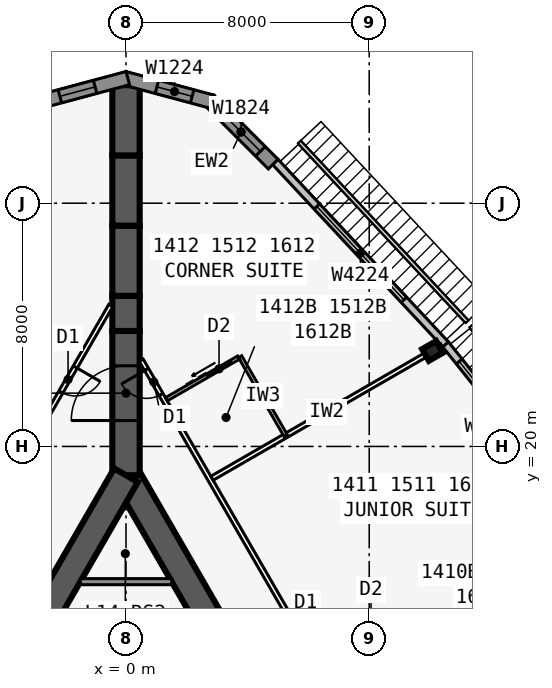
"""IFC4 building model, lengths in metres.
Left out: names, types, materials, properties, quantities, classifications, styles, units other than length and angle.
Written with IfcOpenShell. Run it as: python <this file> out.ifc"""

import sys

from ifc_helpers import new_model, si_unit, direction, frame, frame_2d, origin, origin_2d, place, context, subcontext, project, spatial, polyline, rectangle, i_section, outline, extrude, element, fill, save


model = new_model("IFC4")
c1 = context("Model", 3, precision=1e-05, world=origin(), true_north=direction((0.0, 1.0)))
c2 = subcontext(c1, "Body", "Model", "MODEL_VIEW")
j1 = project(units=[si_unit("LENGTHUNIT", "METRE"), si_unit("PLANEANGLEUNIT", "RADIAN")], contexts=[c1])
p1 = place(None, origin())
s1 = spatial("IfcSite", under=j1, at=p1, CompositionType="ELEMENT")
p2 = place(p1, origin())
s2 = spatial("IfcBuilding", under=s1, at=p2, CompositionType="ELEMENT")
p3 = place(p2, frame((0.0, 0.0, 59.1)))
s3 = spatial("IfcBuildingStorey", under=s2, at=p3, CompositionType="ELEMENT", Elevation=59.1)
p4 = place(p3, frame((16.5, -9.526, 0.0), z_axis=(0.0, 0.0, 1.0), x_axis=(-0.499999749417, 0.866025548458, 0.0)))
e1 = element("IfcWall", 1, at=p4, inside=s3, PredefinedType="SHEAR", context=c2, shape_type="SweptSolid", body=[
    extrude(rectangle(XDim=33.0, YDim=0.9, at=frame_2d((16.5, 0.0))), origin(), (0.0, 0.0, 1.0), 3.4),
])
p5 = place(p4, frame((14.15, 0.0, 0.0)))
e2 = element("IfcOpeningElement", 2, at=p5, cuts=e1, PredefinedType="OPENING", context=c2, shape_type="SweptSolid", body=[
    extrude(rectangle(XDim=1.8, YDim=2.13, at=frame_2d((0.9, 1.065))), frame((0.0, 0.46, 0.0), z_axis=(0.0, -1.0, 0.0), x_axis=(1.0, 0.0, 0.0)), (0.0, 0.0, 1.0), 0.92),
])
p6 = place(p4, frame((12.6, 0.0, 0.0)))
e3 = element("IfcOpeningElement", 3, at=p6, cuts=e1, PredefinedType="OPENING", context=c2, shape_type="SweptSolid", body=[
    extrude(rectangle(XDim=1.0, YDim=2.13, at=frame_2d((0.5, 1.065))), frame((0.0, 0.46, 0.0), z_axis=(0.0, -1.0, 0.0), x_axis=(1.0, 0.0, 0.0)), (0.0, 0.0, 1.0), 0.92),
])
p7 = place(p3, frame((0.0, 19.052, 0.0), z_axis=(0.0, 0.0, 1.0), x_axis=(-0.499999749417, -0.866025548458, 0.0)))
e4 = element("IfcWall", 4, at=p7, inside=s3, PredefinedType="SHEAR", context=c2, shape_type="SweptSolid", body=[
    extrude(rectangle(XDim=33.0, YDim=0.9, at=frame_2d((16.5, 0.0))), origin(), (0.0, 0.0, 1.0), 3.4),
])
p8 = place(p7, frame((14.15, 0.0, 0.0)))
e5 = element("IfcOpeningElement", 5, at=p8, cuts=e4, PredefinedType="OPENING", context=c2, shape_type="SweptSolid", body=[
    extrude(rectangle(XDim=1.8, YDim=2.13, at=frame_2d((0.9, 1.065))), frame((0.0, 0.46, 0.0), z_axis=(0.0, -1.0, 0.0), x_axis=(1.0, 0.0, 0.0)), (0.0, 0.0, 1.0), 0.92),
])
p9 = place(p7, frame((12.6, 0.0, 0.0)))
e6 = element("IfcOpeningElement", 6, at=p9, cuts=e4, PredefinedType="OPENING", context=c2, shape_type="SweptSolid", body=[
    extrude(rectangle(XDim=1.0, YDim=2.13, at=frame_2d((0.5, 1.065))), frame((0.0, 0.46, 0.0), z_axis=(0.0, -1.0, 0.0), x_axis=(1.0, 0.0, 0.0)), (0.0, 0.0, 1.0), 0.92),
])
p10 = place(p3, frame((0.0, 19.052, 0.0), z_axis=(0.0, 0.0, 1.0), x_axis=(0.0, 1.0, 0.0)))
e7 = element("IfcWall", 7, at=p10, inside=s3, PredefinedType="SHEAR", context=c2, shape_type="SweptSolid", body=[
    extrude(rectangle(XDim=4.746, YDim=0.9, at=frame_2d((2.373, 0.0))), origin(), (0.0, 0.0, 1.0), 3.4),
])
p11 = place(p10, frame((1.8, 0.0, 0.0)))
e8 = element("IfcOpeningElement", 8, at=p11, cuts=e7, PredefinedType="OPENING", context=c2, shape_type="SweptSolid", body=[
    extrude(rectangle(XDim=1.8, YDim=2.13, at=frame_2d((0.9, 1.065))), frame((0.0, 0.46, 0.0), z_axis=(0.0, -1.0, 0.0), x_axis=(1.0, 0.0, 0.0)), (0.0, 0.0, 1.0), 0.92),
])
p12 = place(p3, frame((0.0, 23.799, 0.0), z_axis=(0.0, 0.0, 1.0), x_axis=(0.0, 1.0, 0.0)))
e9 = element("IfcWall", 9, at=p12, inside=s3, PredefinedType="SHEAR", context=c2, shape_type="SweptSolid", body=[
    extrude(rectangle(XDim=1.155, YDim=0.9, at=frame_2d((0.577, 0.0))), origin(), (0.0, 0.0, 1.0), 3.4),
])
p13 = place(p3, frame((0.0, 24.953, 0.0), z_axis=(0.0, 0.0, 1.0), x_axis=(0.0, 1.0, 0.0)))
e10 = element("IfcWall", 10, at=p13, inside=s3, PredefinedType="SHEAR", context=c2, shape_type="SweptSolid", body=[
    extrude(rectangle(XDim=2.309, YDim=0.9, at=frame_2d((1.155, 0.0))), origin(), (0.0, 0.0, 1.0), 3.4),
])
p14 = place(p3, frame((0.0, 27.263, 0.0), z_axis=(0.0, 0.0, 1.0), x_axis=(0.0, 1.0, 0.0)))
e11 = element("IfcWall", 11, at=p14, inside=s3, PredefinedType="SHEAR", context=c2, shape_type="SweptSolid", body=[
    extrude(rectangle(XDim=2.31, YDim=0.9, at=frame_2d((1.155, 0.0))), origin(), (0.0, 0.0, 1.0), 3.4),
])
p15 = place(p3, frame((0.0, 29.572, 0.0), z_axis=(0.0, 0.0, 1.0), x_axis=(0.0, 1.0, 0.0)))
e12 = element("IfcWall", 12, at=p15, inside=s3, PredefinedType="SHEAR", context=c2, shape_type="SweptSolid", body=[
    extrude(rectangle(XDim=2.309, YDim=0.9, at=frame_2d((1.155, 0.0))), origin(), (0.0, 0.0, 1.0), 3.4),
])
p16 = place(p3, frame((10.083, 23.142, 0.0), z_axis=(0.0, 0.0, 1.0), x_axis=(-0.5, 0.866025403784, 0.0)))
e13 = element("IfcColumn", 13, at=p16, inside=s3, PredefinedType="COLUMN", context=c2, shape_type="SweptSolid", body=[
    extrude(i_section(OverallWidth=0.442, OverallDepth=0.531, WebThickness=0.066, FlangeThickness=0.106, at=origin_2d()), origin(), (0.0, 0.0, 1.0), 3.4),
])
p17 = place(p3, frame((13.664, 19.414, 0.0), z_axis=(0.0, 0.0, 1.0), x_axis=(-0.624594965756, 0.780948864364, 0.0)))
e14 = element("IfcWall", 14, at=p17, inside=s3, PredefinedType="STANDARD", context=c2, shape_type="SweptSolid", body=[
    extrude(rectangle(XDim=5.058, YDim=0.25, at=frame_2d((2.529, 0.0))), origin(), (0.0, 0.0, 1.0), 3.235),
])
p18 = place(p17, frame((0.729, 0.0, 0.45)))
e15 = element("IfcOpeningElement", 15, at=p18, cuts=e14, PredefinedType="OPENING", context=c2, shape_type="SweptSolid", body=[
    extrude(rectangle(XDim=3.6, YDim=2.4, at=frame_2d((1.8, 1.2))), frame((0.0, 0.135, 0.0), z_axis=(0.0, -1.0, 0.0), x_axis=(1.0, 0.0, 0.0)), (0.0, 0.0, 1.0), 0.27),
])
p19 = place(p3, frame((10.511, 23.357, 0.0), z_axis=(0.0, 0.0, 1.0), x_axis=(-0.682289646561, 0.731081964075, 0.0)))
e16 = element("IfcWall", 16, at=p19, inside=s3, PredefinedType="STANDARD", context=c2, shape_type="SweptSolid", body=[
    extrude(rectangle(XDim=8.211, YDim=0.25, at=frame_2d((4.105, 0.0))), origin(), (0.0, 0.0, 1.0), 3.235),
])
p20 = place(p19, frame((2.006, 0.0, 0.45)))
e17 = element("IfcOpeningElement", 17, at=p20, cuts=e16, PredefinedType="OPENING", context=c2, shape_type="SweptSolid", body=[
    extrude(rectangle(XDim=4.2, YDim=2.4, at=frame_2d((2.1, 1.2))), frame((0.0, 0.135, 0.0), z_axis=(0.0, -1.0, 0.0), x_axis=(1.0, 0.0, 0.0)), (0.0, 0.0, 1.0), 0.27),
])
p21 = place(p3, frame((4.841, 29.286, 0.0), z_axis=(0.0, 0.0, 1.0), x_axis=(-0.707106781187, 0.707106781187, 0.0)))
e18 = element("IfcWall", 18, at=p21, inside=s3, PredefinedType="SOLIDWALL", context=c2, shape_type="SweptSolid", body=[
    extrude(rectangle(XDim=2.988, YDim=0.45, at=frame_2d((1.494, 0.0))), origin(), (0.0, 0.0, 1.0), 3.235),
])
p22 = place(p21, frame((0.594, 0.0, 0.45)))
e19 = element("IfcOpeningElement", 19, at=p22, cuts=e18, PredefinedType="OPENING", context=c2, shape_type="SweptSolid", body=[
    extrude(rectangle(XDim=1.8, YDim=2.4, at=frame_2d((0.9, 1.2))), frame((0.0, 0.235, 0.0), z_axis=(0.0, -1.0, 0.0), x_axis=(1.0, 0.0, 0.0)), (0.0, 0.0, 1.0), 0.47),
])
p23 = place(p3, frame((2.829, 31.341, 0.0), z_axis=(0.0, 0.0, 1.0), x_axis=(-0.965930548995, 0.258801419081, 0.0)))
e20 = element("IfcWall", 20, at=p23, inside=s3, PredefinedType="SOLIDWALL", context=c2, shape_type="SweptSolid", body=[
    extrude(outline(polyline([(2.989, 0.225), (2.929, 0.225), (2.438, 0.093), (2.402, 0.225), (0.0, 0.225), (0.0, -0.225), (2.989, -0.225), (2.989, 0.225)])), origin(), (0.0, 0.0, 1.0), 3.235),
])
p24 = place(p23, frame((0.676, 0.0, 0.45)))
e21 = element("IfcOpeningElement", 21, at=p24, cuts=e20, PredefinedType="OPENING", context=c2, shape_type="SweptSolid", body=[
    extrude(rectangle(XDim=1.2, YDim=2.4, at=frame_2d((0.6, 1.2))), frame((0.0, 0.235, 0.0), z_axis=(0.0, -1.0, 0.0), x_axis=(1.0, 0.0, 0.0)), (0.0, 0.0, 1.0), 0.47),
])
p25 = place(p3, frame((0.058, 32.114, 0.0), z_axis=(0.0, 0.0, 1.0), x_axis=(-0.965930548995, -0.258801419081, 0.0)))
e22 = element("IfcWall", 22, at=p25, inside=s3, PredefinedType="SOLIDWALL", context=c2, shape_type="SweptSolid", body=[
    extrude(outline(polyline([(2.989, 0.225), (0.586, 0.225), (0.551, 0.093), (0.059, 0.225), (0.0, 0.225), (0.0, -0.225), (2.989, -0.225), (2.989, 0.225)])), origin(), (0.0, 0.0, 1.0), 3.235),
])
p26 = place(p25, frame((1.113, 0.0, 0.45)))
e23 = element("IfcOpeningElement", 23, at=p26, cuts=e22, PredefinedType="OPENING", context=c2, shape_type="SweptSolid", body=[
    extrude(rectangle(XDim=1.2, YDim=2.4, at=frame_2d((0.6, 1.2))), frame((0.0, 0.235, 0.0), z_axis=(0.0, -1.0, 0.0), x_axis=(1.0, 0.0, 0.0)), (0.0, 0.0, 1.0), 0.47),
])
p27 = place(p3, frame((20.027, -10.985, 0.0), z_axis=(0.0, 0.0, 1.0), x_axis=(-0.500001677587, 0.866024435227, 0.0)))
e24 = element("IfcWall", 24, at=p27, inside=s3, PredefinedType="PARTITIONING", context=c2, shape_type="SweptSolid", body=[
    extrude(rectangle(XDim=39.054, YDim=0.15, at=frame_2d((19.527, 0.0))), origin(), (0.0, 0.0, 1.0), 3.235),
])
p28 = place(p27, frame((0.352, 0.0, 0.0)))
e25 = element("IfcOpeningElement", 25, at=p28, cuts=e24, PredefinedType="OPENING", context=c2, shape_type="SweptSolid", body=[
    extrude(rectangle(XDim=0.95, YDim=2.13, at=frame_2d((0.475, 1.065))), frame((0.0, 0.085, 0.0), z_axis=(0.0, -1.0, 0.0), x_axis=(1.0, 0.0, 0.0)), (0.0, 0.0, 1.0), 0.17),
])
p29 = place(p27, frame((10.352, 0.0, 0.0)))
e26 = element("IfcOpeningElement", 26, at=p29, cuts=e24, PredefinedType="OPENING", context=c2, shape_type="SweptSolid", body=[
    extrude(rectangle(XDim=0.95, YDim=2.13, at=frame_2d((0.475, 1.065))), frame((0.0, 0.085, 0.0), z_axis=(0.0, -1.0, 0.0), x_axis=(1.0, 0.0, 0.0)), (0.0, 0.0, 1.0), 0.17),
])
p30 = place(p27, frame((17.152, 0.0, 0.0)))
e27 = element("IfcOpeningElement", 27, at=p30, cuts=e24, PredefinedType="OPENING", context=c2, shape_type="SweptSolid", body=[
    extrude(rectangle(XDim=0.95, YDim=2.13, at=frame_2d((0.475, 1.065))), frame((0.0, 0.085, 0.0), z_axis=(0.0, -1.0, 0.0), x_axis=(1.0, 0.0, 0.0)), (0.0, 0.0, 1.0), 0.17),
])
p31 = place(p27, frame((20.952, 0.0, 0.0)))
e28 = element("IfcOpeningElement", 28, at=p31, cuts=e24, PredefinedType="OPENING", context=c2, shape_type="SweptSolid", body=[
    extrude(rectangle(XDim=0.95, YDim=2.13, at=frame_2d((0.475, 1.065))), frame((0.0, 0.085, 0.0), z_axis=(0.0, -1.0, 0.0), x_axis=(1.0, 0.0, 0.0)), (0.0, 0.0, 1.0), 0.17),
])
p32 = place(p27, frame((27.752, 0.0, 0.0)))
e29 = element("IfcOpeningElement", 29, at=p32, cuts=e24, PredefinedType="OPENING", context=c2, shape_type="SweptSolid", body=[
    extrude(rectangle(XDim=0.95, YDim=2.13, at=frame_2d((0.475, 1.065))), frame((0.0, 0.085, 0.0), z_axis=(0.0, -1.0, 0.0), x_axis=(1.0, 0.0, 0.0)), (0.0, 0.0, 1.0), 0.17),
])
p33 = place(p27, frame((37.752, 0.0, 0.0)))
e30 = element("IfcOpeningElement", 30, at=p33, cuts=e24, PredefinedType="OPENING", context=c2, shape_type="SweptSolid", body=[
    extrude(rectangle(XDim=0.95, YDim=2.13, at=frame_2d((0.475, 1.065))), frame((0.0, 0.085, 0.0), z_axis=(0.0, -1.0, 0.0), x_axis=(1.0, 0.0, 0.0)), (0.0, 0.0, 1.0), 0.17),
])
p34 = place(p3, frame((7.829, 10.293, 0.0), z_axis=(0.0, 0.0, 1.0), x_axis=(0.866016302457, 0.50001576363, 0.0)))
e31 = element("IfcWall", 31, at=p34, inside=s3, PredefinedType="PARTITIONING", context=c2, shape_type="SweptSolid", body=[
    extrude(rectangle(XDim=9.943, YDim=0.15, at=frame_2d((4.972, 0.0))), origin(), (0.0, 0.0, 1.0), 2.389),
])
p35 = place(p3, frame((2.829, 18.954, 0.0), z_axis=(0.0, 0.0, 1.0), x_axis=(0.866020536561, 0.500008430184, 0.0)))
e32 = element("IfcWall", 32, at=p35, inside=s3, PredefinedType="PARTITIONING", context=c2, shape_type="SweptSolid", body=[
    extrude(rectangle(XDim=8.72, YDim=0.15, at=frame_2d((4.36, 0.0))), origin(), (0.0, 0.0, 1.0), 2.389),
])
p36 = place(p3, frame((5.253, 20.354, 0.0), z_axis=(0.0, 0.0, 1.0), x_axis=(-0.499990139034, 0.866031096941, 0.0)))
e33 = element("IfcWall", 33, at=p36, inside=s3, PredefinedType="PLUMBINGWALL", context=c2, shape_type="SweptSolid", body=[
    extrude(rectangle(XDim=3.0, YDim=0.12, at=frame_2d((1.5, 0.0))), origin(), (0.0, 0.0, 1.0), 3.235),
])
p37 = place(p3, frame((1.329, 21.552, 0.0), z_axis=(0.0, 0.0, 1.0), x_axis=(0.865997131366, 0.500048966069, 0.0)))
e34 = element("IfcWall", 34, at=p37, inside=s3, PredefinedType="PLUMBINGWALL", context=c2, shape_type="SweptSolid", body=[
    extrude(rectangle(XDim=2.74, YDim=0.12, at=frame_2d((1.37, 0.0))), origin(), (0.0, 0.0, 1.0), 3.235),
])
p38 = place(p37, frame((1.55, 0.0, 0.0)))
e35 = element("IfcOpeningElement", 35, at=p38, cuts=e34, PredefinedType="OPENING", context=c2, shape_type="SweptSolid", body=[
    extrude(rectangle(XDim=0.9, YDim=2.13, at=frame_2d((0.45, 1.065))), frame((0.0, 0.07, 0.0), z_axis=(0.0, -1.0, 0.0), x_axis=(1.0, 0.0, 0.0)), (0.0, 0.0, 1.0), 0.14),
])
p39 = place(p3, frame((-0.5, 24.636, 0.0), z_axis=(0.0, 0.0, 1.0), x_axis=(-0.500001915564, -0.86602429783, 0.0)))
e36 = element("IfcWall", 36, at=p39, inside=s3, PredefinedType="PARTITIONING", context=c2, shape_type="SweptSolid", body=[
    extrude(rectangle(XDim=42.172, YDim=0.15, at=frame_2d((21.086, 0.0))), origin(), (0.0, 0.0, 1.0), 3.235),
])
p40 = place(p39, frame((2.338, 0.0, 0.0)))
e37 = element("IfcOpeningElement", 37, at=p40, cuts=e36, PredefinedType="OPENING", context=c2, shape_type="SweptSolid", body=[
    extrude(rectangle(XDim=0.95, YDim=2.13, at=frame_2d((0.475, 1.065))), frame((0.0, 0.085, 0.0), z_axis=(0.0, -1.0, 0.0), x_axis=(1.0, 0.0, 0.0)), (0.0, 0.0, 1.0), 0.17),
])
p41 = place(p39, frame((12.511, 0.0, 0.0)))
e38 = element("IfcOpeningElement", 38, at=p41, cuts=e36, PredefinedType="OPENING", context=c2, shape_type="SweptSolid", body=[
    extrude(rectangle(XDim=0.95, YDim=2.13, at=frame_2d((0.475, 1.065))), frame((0.0, 0.085, 0.0), z_axis=(0.0, -1.0, 0.0), x_axis=(1.0, 0.0, 0.0)), (0.0, 0.0, 1.0), 0.17),
])
p42 = place(p39, frame((19.311, 0.0, 0.0)))
e39 = element("IfcOpeningElement", 39, at=p42, cuts=e36, PredefinedType="OPENING", context=c2, shape_type="SweptSolid", body=[
    extrude(rectangle(XDim=0.95, YDim=2.13, at=frame_2d((0.475, 1.065))), frame((0.0, 0.085, 0.0), z_axis=(0.0, -1.0, 0.0), x_axis=(1.0, 0.0, 0.0)), (0.0, 0.0, 1.0), 0.17),
])
p43 = place(p39, frame((28.111, 0.0, 0.0)))
e40 = element("IfcOpeningElement", 40, at=p43, cuts=e36, PredefinedType="OPENING", context=c2, shape_type="SweptSolid", body=[
    extrude(rectangle(XDim=0.95, YDim=2.13, at=frame_2d((0.475, 1.065))), frame((0.0, 0.085, 0.0), z_axis=(0.0, -1.0, 0.0), x_axis=(1.0, 0.0, 0.0)), (0.0, 0.0, 1.0), 0.17),
])
p44 = place(p39, frame((39.311, 0.0, 0.0)))
e41 = element("IfcOpeningElement", 41, at=p44, cuts=e36, PredefinedType="OPENING", context=c2, shape_type="SweptSolid", body=[
    extrude(rectangle(XDim=0.95, YDim=2.13, at=frame_2d((0.475, 1.065))), frame((0.0, 0.085, 0.0), z_axis=(0.0, -1.0, 0.0), x_axis=(1.0, 0.0, 0.0)), (0.0, 0.0, 1.0), 0.17),
])
p45 = place(p3, frame((-1.501, 15.552, 0.0), z_axis=(0.0, 0.0, 1.0), x_axis=(1.0, 0.0, 0.0)))
e42 = element("IfcWall", 42, at=p45, inside=s3, PredefinedType="SOLIDWALL", context=c2, shape_type="SweptSolid", body=[
    extrude(rectangle(XDim=3.002, YDim=0.2, at=frame_2d((1.501, 0.0))), origin(), (0.0, 0.0, 1.0), 3.235),
])
p46 = place(p18, origin())
e43 = element("IfcWindow", 43, at=p46, inside=s3, PartitioningType="SINGLE_PANEL", PredefinedType="WINDOW", context=c2, shape_type="SweptSolid", body=[
    extrude(rectangle(XDim=3.6, YDim=2.4, at=frame_2d((1.8, 1.2))), frame((0.0, 0.03, 0.0), z_axis=(0.0, -1.0, 0.0), x_axis=(1.0, 0.0, 0.0)), (0.0, 0.0, 1.0), 0.06),
])
fill(e15, e43)
p47 = place(p20, origin())
e44 = element("IfcWindow", 44, at=p47, inside=s3, PartitioningType="SINGLE_PANEL", PredefinedType="WINDOW", context=c2, shape_type="SweptSolid", body=[
    extrude(rectangle(XDim=4.2, YDim=2.4, at=frame_2d((2.1, 1.2))), frame((0.0, 0.03, 0.0), z_axis=(0.0, -1.0, 0.0), x_axis=(1.0, 0.0, 0.0)), (0.0, 0.0, 1.0), 0.06),
])
fill(e17, e44)
p48 = place(p22, origin())
e45 = element("IfcWindow", 45, at=p48, inside=s3, PartitioningType="SINGLE_PANEL", PredefinedType="WINDOW", context=c2, shape_type="SweptSolid", body=[
    extrude(rectangle(XDim=1.8, YDim=2.4, at=frame_2d((0.9, 1.2))), frame((0.0, 0.03, 0.0), z_axis=(0.0, -1.0, 0.0), x_axis=(1.0, 0.0, 0.0)), (0.0, 0.0, 1.0), 0.06),
])
fill(e19, e45)
p49 = place(p24, origin())
e46 = element("IfcWindow", 46, at=p49, inside=s3, PartitioningType="SINGLE_PANEL", PredefinedType="WINDOW", context=c2, shape_type="SweptSolid", body=[
    extrude(rectangle(XDim=1.2, YDim=2.4, at=frame_2d((0.6, 1.2))), frame((0.0, 0.03, 0.0), z_axis=(0.0, -1.0, 0.0), x_axis=(1.0, 0.0, 0.0)), (0.0, 0.0, 1.0), 0.06),
])
fill(e21, e46)
p50 = place(p26, origin())
e47 = element("IfcWindow", 47, at=p50, inside=s3, PartitioningType="SINGLE_PANEL", PredefinedType="WINDOW", context=c2, shape_type="SweptSolid", body=[
    extrude(rectangle(XDim=1.2, YDim=2.4, at=frame_2d((0.6, 1.2))), frame((0.0, 0.03, 0.0), z_axis=(0.0, -1.0, 0.0), x_axis=(1.0, 0.0, 0.0)), (0.0, 0.0, 1.0), 0.06),
])
fill(e23, e47)
p51 = place(p38, origin())
e48 = element("IfcDoor", 48, at=p51, inside=s3, OperationType="SLIDING_TO_LEFT", PredefinedType="DOOR", context=c2, shape_type="SweptSolid", body=[
    extrude(rectangle(XDim=0.9, YDim=2.13, at=frame_2d((0.45, 1.065))), frame((0.0, 0.025, 0.0), z_axis=(0.0, -1.0, 0.0), x_axis=(1.0, 0.0, 0.0)), (0.0, 0.0, 1.0), 0.05),
])
fill(e35, e48)
p52 = place(p33, origin())
e49 = element("IfcDoor", 49, at=p52, inside=s3, OperationType="SINGLE_SWING_RIGHT", PredefinedType="DOOR", context=c2, shape_type="SweptSolid", body=[
    extrude(rectangle(XDim=0.95, YDim=2.13, at=frame_2d((0.475, 1.065))), frame((0.0, 0.025, 0.0), z_axis=(0.0, -1.0, 0.0), x_axis=(1.0, 0.0, 0.0)), (0.0, 0.0, 1.0), 0.05),
])
fill(e30, e49)
p53 = place(p40, origin())
e50 = element("IfcDoor", 50, at=p53, inside=s3, OperationType="SINGLE_SWING_LEFT", PredefinedType="DOOR", context=c2, shape_type="SweptSolid", body=[
    extrude(rectangle(XDim=0.95, YDim=2.13, at=frame_2d((0.475, 1.065))), frame((0.0, 0.025, 0.0), z_axis=(0.0, -1.0, 0.0), x_axis=(1.0, 0.0, 0.0)), (0.0, 0.0, 1.0), 0.05),
])
fill(e37, e50)
p54 = place(p11, origin())
e51 = element("IfcDoor", 51, at=p54, inside=s3, OperationType="DOUBLE_DOOR_DOUBLE_SWING", PredefinedType="DOOR", context=c2, shape_type="SweptSolid", body=[
    extrude(rectangle(XDim=1.8, YDim=2.13, at=frame_2d((0.9, 1.065))), frame((0.0, 0.025, 0.0), z_axis=(0.0, -1.0, 0.0), x_axis=(1.0, 0.0, 0.0)), (0.0, 0.0, 1.0), 0.05),
])
fill(e8, e51)
save(model, sys.argv[1])
